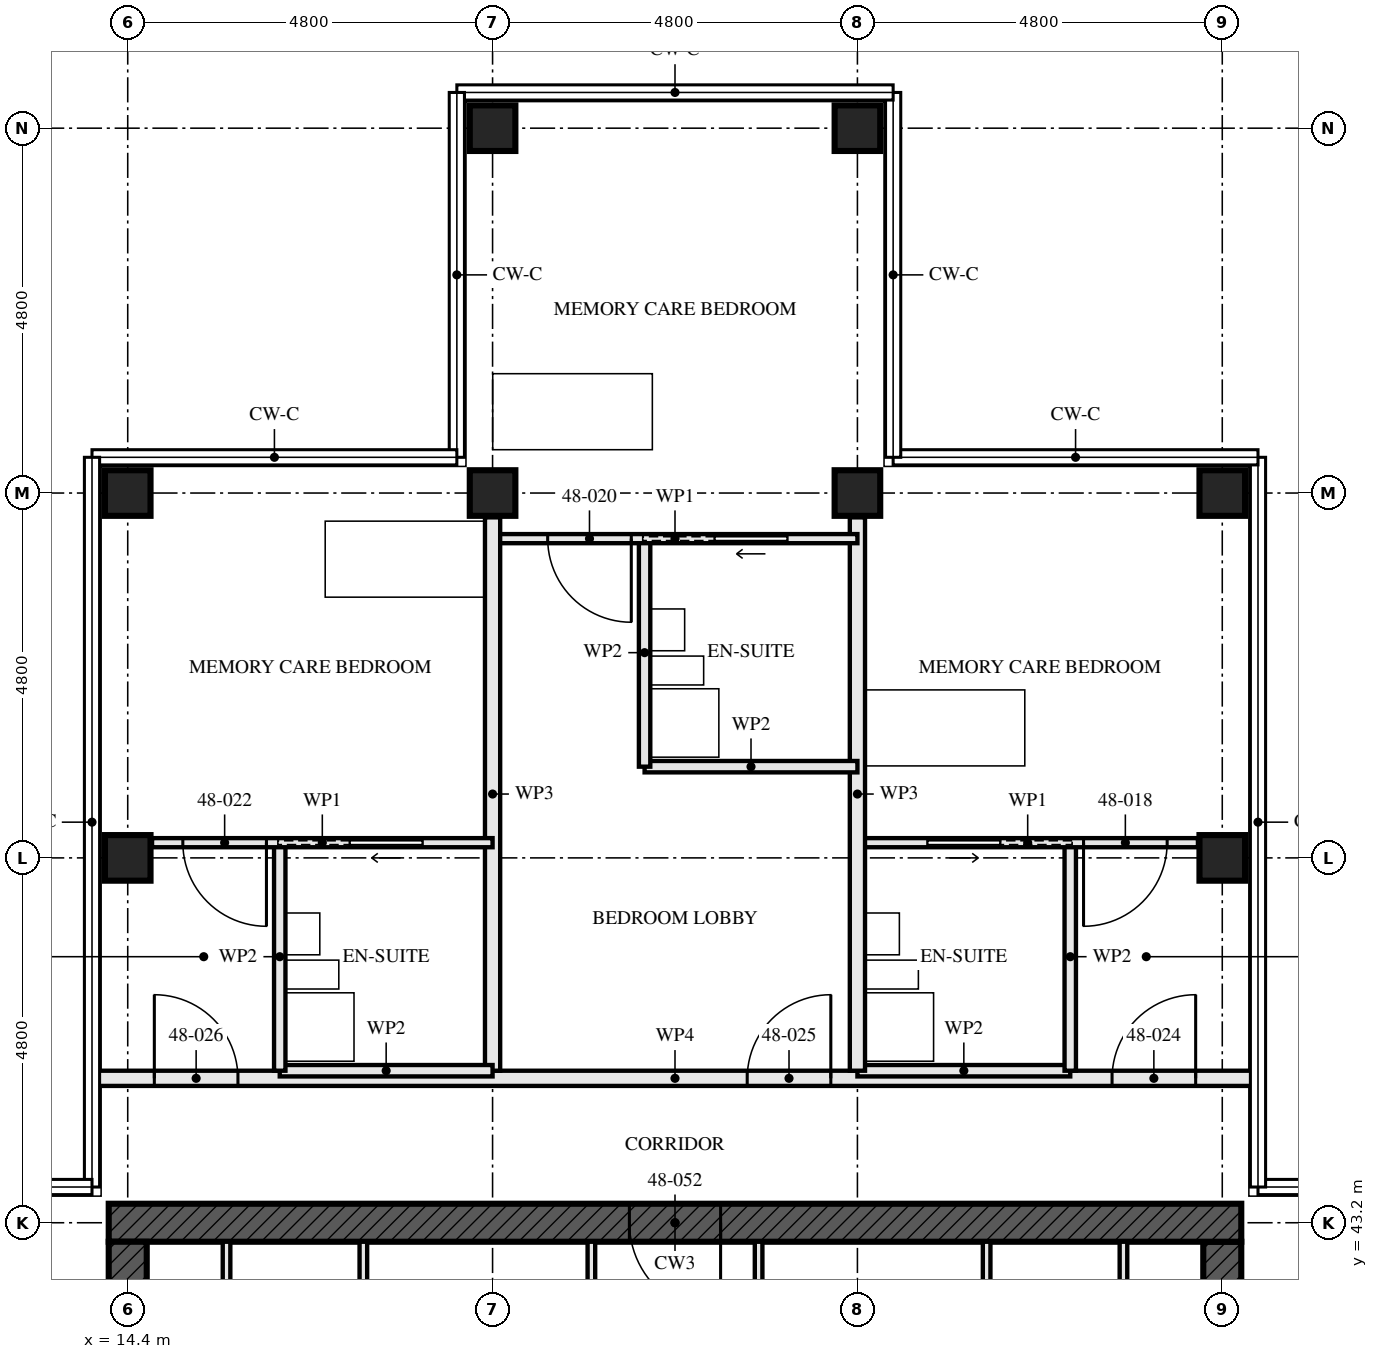
"""IFC4 building model, lengths in metres.
Left out: names, types, materials, properties, quantities, classifications, styles, units other than length and angle.
Written with IfcOpenShell. Run it as: python <this file> out.ifc"""

import sys

from ifc_helpers import new_model, si_unit, direction, frame, frame_2d, origin, origin_2d, place, context, subcontext, project, spatial, rectangle, hollow_rectangle, extrude, element, fill, save


model = new_model("IFC4")
c1 = context("Model", 3, precision=1e-05, world=origin(), true_north=direction((0.0, 1.0)))
c2 = subcontext(c1, "Body", "Model", "MODEL_VIEW")
j1 = project(units=[si_unit("LENGTHUNIT", "METRE"), si_unit("PLANEANGLEUNIT", "RADIAN")], contexts=[c1])
p1 = place(None, origin())
s1 = spatial("IfcSite", under=j1, at=p1, CompositionType="ELEMENT")
p2 = place(p1, origin())
s2 = spatial("IfcBuilding", under=s1, at=p2, CompositionType="ELEMENT")
p3 = place(p2, frame((0.0, 0.0, 176.0)))
s3 = spatial("IfcBuildingStorey", under=s2, at=p3, CompositionType="ELEMENT", Elevation=176.0)
for number, where, z_axis, x_axis in (
    (1, (14.4, 48.0, 0.0), (0.0, 0.0, 1.0), (1.0, 0.0, 0.0)),
    (2, (14.4, 52.8, 0.0), (0.0, 0.0, 1.0), (0.0, 1.0, 0.0)),
    (3, (19.2, 52.8, 0.0), (0.0, 0.0, 1.0), (0.0, 1.0, 0.0)),
    (4, (19.2, 57.6, 0.0), (0.0, 0.0, 1.0), (0.0, 1.0, 0.0)),
    (5, (24.0, 52.8, 0.0), (0.0, 0.0, 1.0), (0.0, 1.0, 0.0)),
    (6, (24.0, 57.6, 0.0), (0.0, 0.0, 1.0), (0.0, 1.0, 0.0)),
    (7, (28.8, 48.0, 0.0), (0.0, 0.0, 1.0), (1.0, 0.0, 0.0)),
    (8, (28.8, 52.8, 0.0), (0.0, 0.0, 1.0), (0.0, 1.0, 0.0)),
):
    element("IfcColumn", number, at=place(p3, frame(where, z_axis=z_axis, x_axis=x_axis)), inside=s3, PredefinedType="COLUMN", context=c2, shape_type="SweptSolid", body=[
        extrude(hollow_rectangle(XDim=0.6, YDim=0.6, WallThickness=0.08, at=origin_2d()), origin(), (0.0, 0.0, 1.0), 3.5),
    ])
p4 = place(p3, frame((29.05, 43.2, -0.17), z_axis=(0.0, 0.0, 1.0), x_axis=(-1.0, 0.0, 0.0)))
e9 = element("IfcWall", 9, at=p4, inside=s3, PredefinedType="SHEAR", context=c2, shape_type="SweptSolid", body=[
    extrude(rectangle(XDim=14.9, YDim=0.5, at=frame_2d((7.45, 0.0))), origin(), (0.0, 0.0, 1.0), 3.5),
])
p5 = place(p4, frame((6.85, 0.0, 0.17)))
e10 = element("IfcOpeningElement", 10, at=p5, cuts=e9, PredefinedType="OPENING", context=c2, shape_type="SweptSolid", body=[
    extrude(rectangle(XDim=1.2, YDim=2.1, at=frame_2d((0.6, 1.05))), frame((0.0, 0.26, 0.0), z_axis=(0.0, -1.0, 0.0), x_axis=(1.0, 0.0, 0.0)), (0.0, 0.0, 1.0), 0.521),
])
p6 = place(p3, frame((14.4, 42.95, -0.17), z_axis=(0.0, 0.0, 1.0), x_axis=(0.0, -1.0, 0.0)))
e11 = element("IfcWall", 11, at=p6, inside=s3, PredefinedType="SHEAR", context=c2, shape_type="SweptSolid", body=[
    extrude(rectangle(XDim=13.9, YDim=0.5, at=frame_2d((6.95, 0.0))), origin(), (0.0, 0.0, 1.0), 3.5),
])
p7 = place(p6, frame((6.35, 0.0, 0.17)))
e12 = element("IfcOpeningElement", 12, at=p7, cuts=e11, PredefinedType="OPENING", context=c2, shape_type="SweptSolid", body=[
    extrude(rectangle(XDim=1.2, YDim=2.1, at=frame_2d((0.6, 1.05))), frame((0.0, 0.26, 0.0), z_axis=(0.0, -1.0, 0.0), x_axis=(1.0, 0.0, 0.0)), (0.0, 0.0, 1.0), 0.521),
])
p8 = place(p3, frame((28.8, 29.05, -0.17), z_axis=(0.0, 0.0, 1.0), x_axis=(0.0, 1.0, 0.0)))
e13 = element("IfcWall", 13, at=p8, inside=s3, PredefinedType="SHEAR", context=c2, shape_type="SweptSolid", body=[
    extrude(rectangle(XDim=13.9, YDim=0.5, at=frame_2d((6.95, 0.0))), origin(), (0.0, 0.0, 1.0), 3.5),
])
p9 = place(p8, frame((6.35, 0.0, 0.17)))
e14 = element("IfcOpeningElement", 14, at=p9, cuts=e13, PredefinedType="OPENING", context=c2, shape_type="SweptSolid", body=[
    extrude(rectangle(XDim=1.2, YDim=2.1, at=frame_2d((0.6, 1.05))), frame((0.0, 0.26, 0.0), z_axis=(0.0, -1.0, 0.0), x_axis=(1.0, 0.0, 0.0)), (0.0, 0.0, 1.0), 0.521),
])
p10 = place(p3, frame((26.8, 48.2, 0.0), z_axis=(0.0, 0.0, 1.0), x_axis=(0.0, -1.0, 0.0)))
e15 = element("IfcWall", 15, at=p10, inside=s3, PredefinedType="PARTITIONING", context=c2, shape_type="SweptSolid", body=[
    extrude(rectangle(XDim=3.0, YDim=0.15, at=frame_2d((1.5, 0.0))), origin(), (0.0, 0.0, 1.0), 2.55),
])
p11 = place(p3, frame((26.8, 45.2, 0.0), z_axis=(0.0, 0.0, 1.0), x_axis=(-1.0, 0.0, 0.0)))
e16 = element("IfcWall", 16, at=p11, inside=s3, PredefinedType="PARTITIONING", context=c2, shape_type="SweptSolid", body=[
    extrude(rectangle(XDim=2.8, YDim=0.15, at=frame_2d((1.4, 0.0))), origin(), (0.0, 0.0, 1.0), 3.33),
])
p12 = place(p3, frame((28.48, 48.2, 0.0), z_axis=(0.0, 0.0, 1.0), x_axis=(-1.0, 0.0, 0.0)))
e17 = element("IfcWall", 17, at=p12, inside=s3, PredefinedType="PARTITIONING", context=c2, shape_type="SweptSolid", body=[
    extrude(rectangle(XDim=4.48, YDim=0.12, at=frame_2d((2.24, 0.0))), origin(), (0.0, 0.0, 1.0), 3.33),
])
p13 = place(p12, frame((0.405, 0.0, 0.0)))
e18 = element("IfcOpeningElement", 18, at=p13, cuts=e17, PredefinedType="OPENING", context=c2, shape_type="SweptSolid", body=[
    extrude(rectangle(XDim=1.1, YDim=2.1, at=frame_2d((0.55, 1.05))), frame((0.0, 0.071, 0.0), z_axis=(0.0, -1.0, 0.0), x_axis=(1.0, 0.0, 0.0)), (0.0, 0.0, 1.0), 0.141),
])
p14 = place(p12, frame((2.605, 0.0, 0.0)))
e19 = element("IfcOpeningElement", 19, at=p14, cuts=e17, PredefinedType="OPENING", context=c2, shape_type="SweptSolid", body=[
    extrude(rectangle(XDim=0.95, YDim=2.1, at=frame_2d((0.475, 1.05))), frame((0.0, 0.071, 0.0), z_axis=(0.0, -1.0, 0.0), x_axis=(1.0, 0.0, 0.0)), (0.0, 0.0, 1.0), 0.141),
])
p15 = place(p3, frame((24.0, 52.48, 0.0), z_axis=(0.0, 0.0, 1.0), x_axis=(0.0, -1.0, 0.0)))
e20 = element("IfcWall", 20, at=p15, inside=s3, PredefinedType="PARTITIONING", context=c2, shape_type="SweptSolid", body=[
    extrude(rectangle(XDim=7.28, YDim=0.2, at=frame_2d((3.64, 0.0))), origin(), (0.0, 0.0, 1.0), 2.55),
])
p16 = place(p3, frame((21.2, 52.2, 0.0), z_axis=(0.0, 0.0, 1.0), x_axis=(0.0, -1.0, 0.0)))
e21 = element("IfcWall", 21, at=p16, inside=s3, PredefinedType="PARTITIONING", context=c2, shape_type="SweptSolid", body=[
    extrude(rectangle(XDim=3.0, YDim=0.15, at=frame_2d((1.5, 0.0))), origin(), (0.0, 0.0, 1.0), 3.33),
])
p17 = place(p3, frame((24.0, 49.2, 0.0), z_axis=(0.0, 0.0, 1.0), x_axis=(-1.0, 0.0, 0.0)))
e22 = element("IfcWall", 22, at=p17, inside=s3, PredefinedType="PARTITIONING", context=c2, shape_type="SweptSolid", body=[
    extrude(rectangle(XDim=2.8, YDim=0.15, at=frame_2d((1.4, 0.0))), origin(), (0.0, 0.0, 1.0), 3.33),
])
p18 = place(p3, frame((24.0, 52.2, 0.0), z_axis=(0.0, 0.0, 1.0), x_axis=(-1.0, 0.0, 0.0)))
e23 = element("IfcWall", 23, at=p18, inside=s3, PredefinedType="PARTITIONING", context=c2, shape_type="SweptSolid", body=[
    extrude(rectangle(XDim=4.8, YDim=0.12, at=frame_2d((2.4, 0.0))), origin(), (0.0, 0.0, 1.0), 3.33),
])
p19 = place(p18, frame((2.975, 0.0, 0.0)))
e24 = element("IfcOpeningElement", 24, at=p19, cuts=e23, PredefinedType="OPENING", context=c2, shape_type="SweptSolid", body=[
    extrude(rectangle(XDim=1.1, YDim=2.1, at=frame_2d((0.55, 1.05))), frame((0.0, 0.071, 0.0), z_axis=(0.0, -1.0, 0.0), x_axis=(1.0, 0.0, 0.0)), (0.0, 0.0, 1.0), 0.141),
])
p20 = place(p18, frame((0.925, 0.0, 0.0)))
e25 = element("IfcOpeningElement", 25, at=p20, cuts=e23, PredefinedType="OPENING", context=c2, shape_type="SweptSolid", body=[
    extrude(rectangle(XDim=0.95, YDim=2.1, at=frame_2d((0.475, 1.05))), frame((0.0, 0.071, 0.0), z_axis=(0.0, -1.0, 0.0), x_axis=(1.0, 0.0, 0.0)), (0.0, 0.0, 1.0), 0.141),
])
p21 = place(p3, frame((19.2, 52.48, 0.0), z_axis=(0.0, 0.0, 1.0), x_axis=(0.0, -1.0, 0.0)))
e26 = element("IfcWall", 26, at=p21, inside=s3, PredefinedType="PARTITIONING", context=c2, shape_type="SweptSolid", body=[
    extrude(rectangle(XDim=7.28, YDim=0.2, at=frame_2d((3.64, 0.0))), origin(), (0.0, 0.0, 1.0), 2.55),
])
p22 = place(p3, frame((16.4, 48.2, 0.0), z_axis=(0.0, 0.0, 1.0), x_axis=(0.0, -1.0, 0.0)))
e27 = element("IfcWall", 27, at=p22, inside=s3, PredefinedType="PARTITIONING", context=c2, shape_type="SweptSolid", body=[
    extrude(rectangle(XDim=3.0, YDim=0.15, at=frame_2d((1.5, 0.0))), origin(), (0.0, 0.0, 1.0), 2.55),
])
p23 = place(p3, frame((19.2, 45.2, 0.0), z_axis=(0.0, 0.0, 1.0), x_axis=(-1.0, 0.0, 0.0)))
e28 = element("IfcWall", 28, at=p23, inside=s3, PredefinedType="PARTITIONING", context=c2, shape_type="SweptSolid", body=[
    extrude(rectangle(XDim=2.8, YDim=0.15, at=frame_2d((1.4, 0.0))), origin(), (0.0, 0.0, 1.0), 3.33),
])
p24 = place(p3, frame((19.2, 48.2, 0.0), z_axis=(0.0, 0.0, 1.0), x_axis=(-1.0, 0.0, 0.0)))
e29 = element("IfcWall", 29, at=p24, inside=s3, PredefinedType="PARTITIONING", context=c2, shape_type="SweptSolid", body=[
    extrude(rectangle(XDim=4.48, YDim=0.12, at=frame_2d((2.24, 0.0))), origin(), (0.0, 0.0, 1.0), 3.33),
])
p25 = place(p24, frame((2.975, 0.0, 0.0)))
e30 = element("IfcOpeningElement", 30, at=p25, cuts=e29, PredefinedType="OPENING", context=c2, shape_type="SweptSolid", body=[
    extrude(rectangle(XDim=1.1, YDim=2.1, at=frame_2d((0.55, 1.05))), frame((0.0, 0.071, 0.0), z_axis=(0.0, -1.0, 0.0), x_axis=(1.0, 0.0, 0.0)), (0.0, 0.0, 1.0), 0.141),
])
p26 = place(p24, frame((0.925, 0.0, 0.0)))
e31 = element("IfcOpeningElement", 31, at=p26, cuts=e29, PredefinedType="OPENING", context=c2, shape_type="SweptSolid", body=[
    extrude(rectangle(XDim=0.95, YDim=2.1, at=frame_2d((0.475, 1.05))), frame((0.0, 0.071, 0.0), z_axis=(0.0, -1.0, 0.0), x_axis=(1.0, 0.0, 0.0)), (0.0, 0.0, 1.0), 0.141),
])
p27 = place(p3, frame((29.25, 45.1, 0.0), z_axis=(0.0, 0.0, 1.0), x_axis=(-1.0, 0.0, 0.0)))
e32 = element("IfcWall", 32, at=p27, inside=s3, PredefinedType="PARTITIONING", context=c2, shape_type="SweptSolid", body=[
    extrude(rectangle(XDim=15.3, YDim=0.2, at=frame_2d((7.65, 0.0))), origin(), (0.0, 0.0, 1.0), 2.32),
])
p28 = place(p27, frame((0.8, 0.0, 0.0)))
e33 = element("IfcOpeningElement", 33, at=p28, cuts=e32, PredefinedType="OPENING", context=c2, shape_type="SweptSolid", body=[
    extrude(rectangle(XDim=1.1, YDim=2.1, at=frame_2d((0.55, 1.05))), frame((0.0, 0.111, 0.0), z_axis=(0.0, -1.0, 0.0), x_axis=(1.0, 0.0, 0.0)), (0.0, 0.0, 1.0), 0.221),
])
p29 = place(p27, frame((5.6, 0.0, 0.0)))
e34 = element("IfcOpeningElement", 34, at=p29, cuts=e32, PredefinedType="OPENING", context=c2, shape_type="SweptSolid", body=[
    extrude(rectangle(XDim=1.1, YDim=2.1, at=frame_2d((0.55, 1.05))), frame((0.0, 0.111, 0.0), z_axis=(0.0, -1.0, 0.0), x_axis=(1.0, 0.0, 0.0)), (0.0, 0.0, 1.0), 0.221),
])
p30 = place(p27, frame((13.4, 0.0, 0.0)))
e35 = element("IfcOpeningElement", 35, at=p30, cuts=e32, PredefinedType="OPENING", context=c2, shape_type="SweptSolid", body=[
    extrude(rectangle(XDim=1.1, YDim=2.1, at=frame_2d((0.55, 1.05))), frame((0.0, 0.111, 0.0), z_axis=(0.0, -1.0, 0.0), x_axis=(1.0, 0.0, 0.0)), (0.0, 0.0, 1.0), 0.221),
])
for number, where, z_axis, x_axis in (
    (36, (15.7, 37.15, 0.0), (0.0, 0.0, 1.0), (0.0, 1.0, 0.0)),
    (37, (27.5, 37.15, 0.0), (0.0, 0.0, 1.0), (0.0, 1.0, 0.0)),
):
    element("IfcWall", number, at=place(p3, frame(where, z_axis=z_axis, x_axis=x_axis)), inside=s3, PredefinedType="SOLIDWALL", context=c2, shape_type="SweptSolid", body=[
        extrude(rectangle(XDim=5.8, YDim=0.1, at=frame_2d((2.9, 0.0))), origin(), (0.0, 0.0, 1.0), 3.33),
    ])
p31 = place(p3, frame((20.5, 37.15, 0.0), z_axis=(0.0, 0.0, 1.0), x_axis=(0.0, 1.0, 0.0)))
e38 = element("IfcWall", 38, at=p31, inside=s3, PredefinedType="SOLIDWALL", context=c2, shape_type="SweptSolid", body=[
    extrude(rectangle(XDim=5.8, YDim=0.1, at=frame_2d((2.9, 0.0))), origin(), (0.0, 0.0, 1.0), 3.33),
])
p32 = place(p31, frame((0.975, 0.0, 0.0)))
e39 = element("IfcOpeningElement", 39, at=p32, cuts=e38, PredefinedType="OPENING", context=c2, shape_type="SweptSolid", body=[
    extrude(rectangle(XDim=0.9, YDim=2.1, at=frame_2d((0.45, 1.05))), frame((0.0, 0.061, 0.0), z_axis=(0.0, -1.0, 0.0), x_axis=(1.0, 0.0, 0.0)), (0.0, 0.0, 1.0), 0.121),
])
p33 = place(p3, frame((22.7, 37.15, 0.0), z_axis=(0.0, 0.0, 1.0), x_axis=(0.0, 1.0, 0.0)))
e40 = element("IfcWall", 40, at=p33, inside=s3, PredefinedType="SOLIDWALL", context=c2, shape_type="SweptSolid", body=[
    extrude(rectangle(XDim=5.8, YDim=0.1, at=frame_2d((2.9, 0.0))), origin(), (0.0, 0.0, 1.0), 3.33),
])
p34 = place(p33, frame((0.975, 0.0, 0.0)))
e41 = element("IfcOpeningElement", 41, at=p34, cuts=e40, PredefinedType="OPENING", context=c2, shape_type="SweptSolid", body=[
    extrude(rectangle(XDim=0.9, YDim=2.1, at=frame_2d((0.45, 1.05))), frame((0.0, 0.061, 0.0), z_axis=(0.0, -1.0, 0.0), x_axis=(1.0, 0.0, 0.0)), (0.0, 0.0, 1.0), 0.121),
])
for number, where, z_axis, x_axis in (
    (42, (17.5, 37.15, 0.0), (0.0, 0.0, 1.0), (0.0, 1.0, 0.0)),
    (43, (25.7, 37.15, 0.0), (0.0, 0.0, 1.0), (0.0, 1.0, 0.0)),
):
    element("IfcWall", number, at=place(p3, frame(where, z_axis=z_axis, x_axis=x_axis)), inside=s3, PredefinedType="SOLIDWALL", context=c2, shape_type="SweptSolid", body=[
        extrude(rectangle(XDim=5.8, YDim=0.1, at=frame_2d((2.9, 0.0))), origin(), (0.0, 0.0, 1.0), 3.33),
    ])
p35 = place(p13, origin())
e44 = element("IfcDoor", 44, at=p35, inside=s3, OperationType="SINGLE_SWING_LEFT", PredefinedType="DOOR", context=c2, shape_type="SweptSolid", body=[
    extrude(rectangle(XDim=1.1, YDim=2.1, at=frame_2d((0.55, 1.05))), frame((0.0, 0.022, 0.0), z_axis=(0.0, -1.0, 0.0), x_axis=(1.0, 0.0, 0.0)), (0.0, 0.0, 1.0), 0.044),
])
fill(e18, e44)
p36 = place(p14, origin())
e45 = element("IfcDoor", 45, at=p36, inside=s3, OperationType="SLIDING_TO_RIGHT", PredefinedType="DOOR", context=c2, shape_type="SweptSolid", body=[
    extrude(rectangle(XDim=0.95, YDim=2.1, at=frame_2d((0.475, 1.05))), frame((0.0, 0.022, 0.0), z_axis=(0.0, -1.0, 0.0), x_axis=(1.0, 0.0, 0.0)), (0.0, 0.0, 1.0), 0.044),
])
fill(e19, e45)
p37 = place(p19, origin())
e46 = element("IfcDoor", 46, at=p37, inside=s3, OperationType="SINGLE_SWING_RIGHT", PredefinedType="DOOR", context=c2, shape_type="SweptSolid", body=[
    extrude(rectangle(XDim=1.1, YDim=2.1, at=frame_2d((0.55, 1.05))), frame((0.0, 0.022, 0.0), z_axis=(0.0, -1.0, 0.0), x_axis=(1.0, 0.0, 0.0)), (0.0, 0.0, 1.0), 0.044),
])
fill(e24, e46)
p38 = place(p20, origin())
e47 = element("IfcDoor", 47, at=p38, inside=s3, OperationType="SLIDING_TO_LEFT", PredefinedType="DOOR", context=c2, shape_type="SweptSolid", body=[
    extrude(rectangle(XDim=0.95, YDim=2.1, at=frame_2d((0.475, 1.05))), frame((0.0, 0.022, 0.0), z_axis=(0.0, -1.0, 0.0), x_axis=(1.0, 0.0, 0.0)), (0.0, 0.0, 1.0), 0.044),
])
fill(e25, e47)
p39 = place(p25, origin())
e48 = element("IfcDoor", 48, at=p39, inside=s3, OperationType="SINGLE_SWING_RIGHT", PredefinedType="DOOR", context=c2, shape_type="SweptSolid", body=[
    extrude(rectangle(XDim=1.1, YDim=2.1, at=frame_2d((0.55, 1.05))), frame((0.0, 0.022, 0.0), z_axis=(0.0, -1.0, 0.0), x_axis=(1.0, 0.0, 0.0)), (0.0, 0.0, 1.0), 0.044),
])
fill(e30, e48)
p40 = place(p26, origin())
e49 = element("IfcDoor", 49, at=p40, inside=s3, OperationType="SLIDING_TO_LEFT", PredefinedType="DOOR", context=c2, shape_type="SweptSolid", body=[
    extrude(rectangle(XDim=0.95, YDim=2.1, at=frame_2d((0.475, 1.05))), frame((0.0, 0.022, 0.0), z_axis=(0.0, -1.0, 0.0), x_axis=(1.0, 0.0, 0.0)), (0.0, 0.0, 1.0), 0.044),
])
fill(e31, e49)
p41 = place(p28, frame((1.1, 0.0, 0.0), z_axis=(0.0, 0.0, 1.0), x_axis=(-1.0, 0.0, 0.0)))
e50 = element("IfcDoor", 50, at=p41, inside=s3, OperationType="SINGLE_SWING_LEFT", PredefinedType="DOOR", context=c2, shape_type="SweptSolid", body=[
    extrude(rectangle(XDim=1.1, YDim=2.1, at=frame_2d((0.55, 1.05))), frame((0.0, 0.027, 0.0), z_axis=(0.0, -1.0, 0.0), x_axis=(1.0, 0.0, 0.0)), (0.0, 0.0, 1.0), 0.054),
])
fill(e33, e50)
p42 = place(p29, frame((1.1, 0.0, 0.0), z_axis=(0.0, 0.0, 1.0), x_axis=(-1.0, 0.0, 0.0)))
e51 = element("IfcDoor", 51, at=p42, inside=s3, OperationType="SINGLE_SWING_LEFT", PredefinedType="DOOR", context=c2, shape_type="SweptSolid", body=[
    extrude(rectangle(XDim=1.1, YDim=2.1, at=frame_2d((0.55, 1.05))), frame((0.0, 0.027, 0.0), z_axis=(0.0, -1.0, 0.0), x_axis=(1.0, 0.0, 0.0)), (0.0, 0.0, 1.0), 0.054),
])
fill(e34, e51)
p43 = place(p30, frame((1.1, 0.0, 0.0), z_axis=(0.0, 0.0, 1.0), x_axis=(-1.0, 0.0, 0.0)))
e52 = element("IfcDoor", 52, at=p43, inside=s3, OperationType="SINGLE_SWING_RIGHT", PredefinedType="DOOR", context=c2, shape_type="SweptSolid", body=[
    extrude(rectangle(XDim=1.1, YDim=2.1, at=frame_2d((0.55, 1.05))), frame((0.0, 0.027, 0.0), z_axis=(0.0, -1.0, 0.0), x_axis=(1.0, 0.0, 0.0)), (0.0, 0.0, 1.0), 0.054),
])
fill(e35, e52)
p44 = place(p5, origin())
e53 = element("IfcDoor", 53, at=p44, inside=s3, OperationType="SINGLE_SWING_LEFT", PredefinedType="DOOR", context=c2, shape_type="SweptSolid", body=[
    extrude(rectangle(XDim=1.2, YDim=2.1, at=frame_2d((0.6, 1.05))), frame((0.0, 0.027, 0.0), z_axis=(0.0, -1.0, 0.0), x_axis=(1.0, 0.0, 0.0)), (0.0, 0.0, 1.0), 0.054),
])
fill(e10, e53)
save(model, sys.argv[1])
